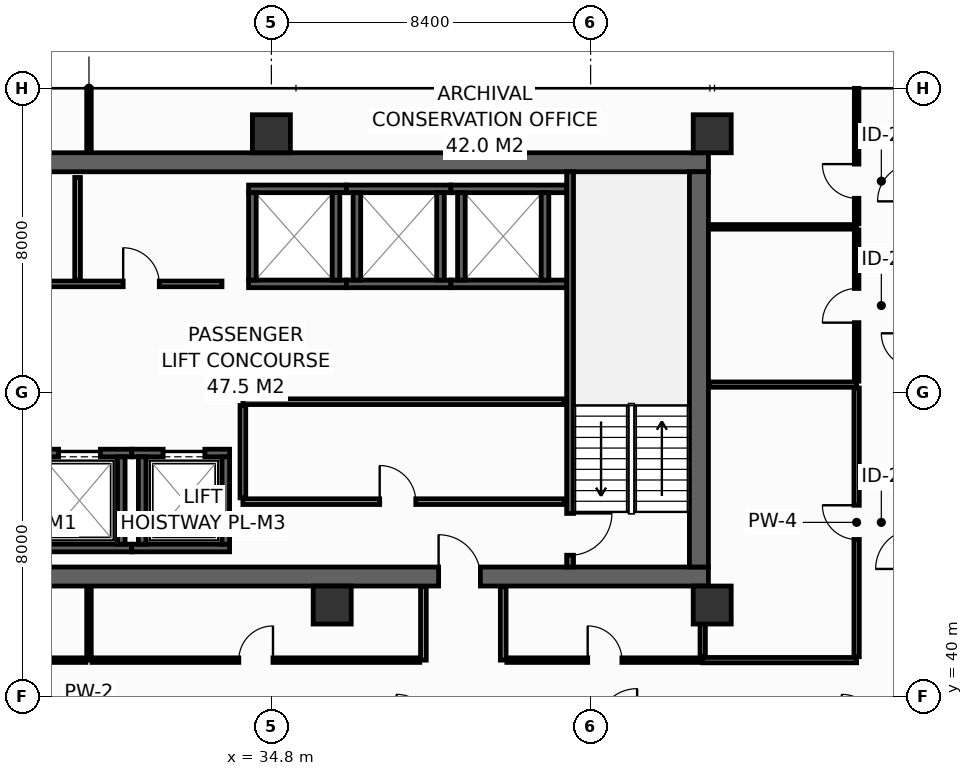
"""IFC4 building model, lengths in metres.
Left out: names, types, materials, properties, quantities, classifications, styles, units other than length and angle.
Written with IfcOpenShell. Run it as: python <this file> out.ifc"""

import sys

from ifc_helpers import new_model, si_unit, direction, frame, frame_2d, origin, origin_2d, place, context, subcontext, project, spatial, rectangle, hollow_rectangle, extrude, element, fill, save


model = new_model("IFC4")
c1 = context("Model", 3, precision=1e-05, world=origin(), true_north=direction((0.0, 1.0)))
c2 = subcontext(c1, "Body", "Model", "MODEL_VIEW")
j1 = project(units=[si_unit("LENGTHUNIT", "METRE"), si_unit("PLANEANGLEUNIT", "RADIAN")], contexts=[c1])
p1 = place(None, origin())
s1 = spatial("IfcSite", under=j1, at=p1, CompositionType="ELEMENT")
p2 = place(p1, origin())
s2 = spatial("IfcBuilding", under=s1, at=p2, CompositionType="ELEMENT")
p3 = place(p2, frame((0.0, 0.0, 179.0)))
s3 = spatial("IfcBuildingStorey", under=s2, at=p3, CompositionType="ELEMENT", Elevation=179.0)
p4 = place(p3, frame((13.6, 43.15, 0.0), z_axis=(0.0, 0.0, 1.0), x_axis=(1.0, 0.0, 0.0)))
e1 = element("IfcWall", 1, at=p4, inside=s3, PredefinedType="SHEAR", context=c2, shape_type="SweptSolid", body=[
    extrude(rectangle(XDim=32.7, YDim=0.5, at=frame_2d((16.35, 0.0))), origin(), (0.0, 0.0, 1.0), 3.55),
])
p5 = place(p4, frame((5.4, 0.0, 0.0)))
e2 = element("IfcOpeningElement", 2, at=p5, cuts=e1, PredefinedType="OPENING", context=c2, shape_type="SweptSolid", body=[
    extrude(rectangle(XDim=1.1, YDim=2.15, at=frame_2d((0.55, 1.075))), frame((0.0, 0.26, 0.0), z_axis=(0.0, -1.0, 0.0), x_axis=(1.0, 0.0, 0.0)), (0.0, 0.0, 1.0), 0.52),
])
p6 = place(p4, frame((25.6, 0.0, 0.0)))
e3 = element("IfcOpeningElement", 3, at=p6, cuts=e1, PredefinedType="OPENING", context=c2, shape_type="SweptSolid", body=[
    extrude(rectangle(XDim=1.1, YDim=2.15, at=frame_2d((0.55, 1.075))), frame((0.0, 0.26, 0.0), z_axis=(0.0, -1.0, 0.0), x_axis=(1.0, 0.0, 0.0)), (0.0, 0.0, 1.0), 0.52),
])
p7 = place(p3, frame((13.6, 54.05, 0.0), z_axis=(0.0, 0.0, 1.0), x_axis=(1.0, 0.0, 0.0)))
e4 = element("IfcWall", 4, at=p7, inside=s3, PredefinedType="SHEAR", context=c2, shape_type="SweptSolid", body=[
    extrude(rectangle(XDim=32.7, YDim=0.5, at=frame_2d((16.35, 0.0))), origin(), (0.0, 0.0, 1.0), 3.55),
])
p8 = place(p3, frame((46.05, 43.4, 0.0), z_axis=(0.0, 0.0, 1.0), x_axis=(0.0, 1.0, 0.0)))
e5 = element("IfcWall", 5, at=p8, inside=s3, PredefinedType="SHEAR", context=c2, shape_type="SweptSolid", body=[
    extrude(rectangle(XDim=10.4, YDim=0.5, at=frame_2d((5.2, 0.0))), origin(), (0.0, 0.0, 1.0), 3.55),
])
for number, where, z_axis, x_axis in (
    (6, (34.8, 54.8, 0.0), (0.0, 0.0, 1.0), (1.0, 0.0, 0.0)),
    (7, (46.4, 54.8, 0.0), (0.0, 0.0, 1.0), (1.0, 0.0, 0.0)),
    (8, (36.4, 42.4, 0.0), (0.0, 0.0, 1.0), (1.0, 0.0, 0.0)),
    (9, (46.4, 42.4, 0.0), (0.0, 0.0, 1.0), (1.0, 0.0, 0.0)),
):
    element("IfcColumn", number, at=place(p3, frame(where, z_axis=z_axis, x_axis=x_axis)), inside=s3, PredefinedType="COLUMN", context=c2, shape_type="SweptSolid", body=[
        extrude(hollow_rectangle(XDim=1.0, YDim=1.0, WallThickness=0.045, at=origin_2d()), origin(), (0.0, 0.0, 1.0), 3.8),
    ])
p9 = place(p3, frame((28.375, 43.9, 0.0), z_axis=(0.0, 0.0, 1.0), x_axis=(1.0, 0.0, 0.0)))
e10 = element("IfcWall", 10, at=p9, inside=s3, PredefinedType="SHEAR", context=c2, shape_type="SweptSolid", body=[
    extrude(rectangle(XDim=2.75, YDim=0.2, at=frame_2d((1.375, 0.0))), origin(), (0.0, 0.0, 1.0), 3.55),
])
p10 = place(p3, frame((28.375, 46.4, 0.0), z_axis=(0.0, 0.0, 1.0), x_axis=(1.0, 0.0, 0.0)))
e11 = element("IfcWall", 11, at=p10, inside=s3, PredefinedType="SHEAR", context=c2, shape_type="SweptSolid", body=[
    extrude(rectangle(XDim=2.75, YDim=0.2, at=frame_2d((1.375, 0.0))), origin(), (0.0, 0.0, 1.0), 3.55),
])
p11 = place(p10, frame((0.825, 0.0, 0.0)))
e12 = element("IfcOpeningElement", 12, at=p11, cuts=e11, PredefinedType="OPENING", context=c2, shape_type="SweptSolid", body=[
    extrude(rectangle(XDim=1.1, YDim=2.2, at=frame_2d((0.55, 1.1))), frame((0.0, 0.11, 0.0), z_axis=(0.0, -1.0, 0.0), x_axis=(1.0, 0.0, 0.0)), (0.0, 0.0, 1.0), 0.22),
])
p12 = place(p3, frame((30.85, 44.0, 0.0), z_axis=(0.0, 0.0, 1.0), x_axis=(0.0, 1.0, 0.0)))
e13 = element("IfcWall", 13, at=p12, inside=s3, PredefinedType="SHEAR", context=c2, shape_type="SweptSolid", body=[
    extrude(rectangle(XDim=2.3, YDim=0.2, at=frame_2d((1.15, 0.0))), origin(), (0.0, 0.0, 1.0), 3.55),
])
p13 = place(p3, frame((31.125, 43.9, 0.0), z_axis=(0.0, 0.0, 1.0), x_axis=(1.0, 0.0, 0.0)))
e14 = element("IfcWall", 14, at=p13, inside=s3, PredefinedType="SHEAR", context=c2, shape_type="SweptSolid", body=[
    extrude(rectangle(XDim=2.575, YDim=0.2, at=frame_2d((1.288, 0.0))), origin(), (0.0, 0.0, 1.0), 3.55),
])
p14 = place(p3, frame((31.125, 46.4, 0.0), z_axis=(0.0, 0.0, 1.0), x_axis=(1.0, 0.0, 0.0)))
e15 = element("IfcWall", 15, at=p14, inside=s3, PredefinedType="SHEAR", context=c2, shape_type="SweptSolid", body=[
    extrude(rectangle(XDim=2.575, YDim=0.2, at=frame_2d((1.288, 0.0))), origin(), (0.0, 0.0, 1.0), 3.55),
])
p15 = place(p14, frame((0.825, 0.0, 0.0)))
e16 = element("IfcOpeningElement", 16, at=p15, cuts=e15, PredefinedType="OPENING", context=c2, shape_type="SweptSolid", body=[
    extrude(rectangle(XDim=1.1, YDim=2.2, at=frame_2d((0.55, 1.1))), frame((0.0, 0.11, 0.0), z_axis=(0.0, -1.0, 0.0), x_axis=(1.0, 0.0, 0.0)), (0.0, 0.0, 1.0), 0.22),
])
for number, where, z_axis, x_axis in (
    (17, (31.4, 44.0, 0.0), (0.0, 0.0, 1.0), (0.0, 1.0, 0.0)),
    (18, (33.6, 44.0, 0.0), (0.0, 0.0, 1.0), (0.0, 1.0, 0.0)),
):
    element("IfcWall", number, at=place(p3, frame(where, z_axis=z_axis, x_axis=x_axis)), inside=s3, PredefinedType="SHEAR", context=c2, shape_type="SweptSolid", body=[
        extrude(rectangle(XDim=2.3, YDim=0.2, at=frame_2d((1.15, 0.0))), origin(), (0.0, 0.0, 1.0), 3.55),
    ])
for number, where, z_axis, x_axis in (
    (19, (34.2, 50.85, 0.0), (0.0, 0.0, 1.0), (1.0, 0.0, 0.0)),
    (20, (34.2, 53.35, 0.0), (0.0, 0.0, 1.0), (1.0, 0.0, 0.0)),
):
    element("IfcWall", number, at=place(p3, frame(where, z_axis=z_axis, x_axis=x_axis)), inside=s3, PredefinedType="SHEAR", context=c2, shape_type="SweptSolid", body=[
        extrude(rectangle(XDim=2.575, YDim=0.2, at=frame_2d((1.288, 0.0))), origin(), (0.0, 0.0, 1.0), 3.55),
    ])
for number, where, z_axis, x_axis in (
    (21, (34.3, 50.95, 0.0), (0.0, 0.0, 1.0), (0.0, 1.0, 0.0)),
    (22, (36.5, 50.95, 0.0), (0.0, 0.0, 1.0), (0.0, 1.0, 0.0)),
):
    element("IfcWall", number, at=place(p3, frame(where, z_axis=z_axis, x_axis=x_axis)), inside=s3, PredefinedType="SHEAR", context=c2, shape_type="SweptSolid", body=[
        extrude(rectangle(XDim=2.3, YDim=0.2, at=frame_2d((1.15, 0.0))), origin(), (0.0, 0.0, 1.0), 3.55),
    ])
for number, where, z_axis, x_axis in (
    (23, (36.775, 50.85, 0.0), (0.0, 0.0, 1.0), (1.0, 0.0, 0.0)),
    (24, (36.775, 53.35, 0.0), (0.0, 0.0, 1.0), (1.0, 0.0, 0.0)),
):
    element("IfcWall", number, at=place(p3, frame(where, z_axis=z_axis, x_axis=x_axis)), inside=s3, PredefinedType="SHEAR", context=c2, shape_type="SweptSolid", body=[
        extrude(rectangle(XDim=2.75, YDim=0.2, at=frame_2d((1.375, 0.0))), origin(), (0.0, 0.0, 1.0), 3.55),
    ])
for number, where, z_axis, x_axis in (
    (25, (37.05, 50.95, 0.0), (0.0, 0.0, 1.0), (0.0, 1.0, 0.0)),
    (26, (39.25, 50.95, 0.0), (0.0, 0.0, 1.0), (0.0, 1.0, 0.0)),
):
    element("IfcWall", number, at=place(p3, frame(where, z_axis=z_axis, x_axis=x_axis)), inside=s3, PredefinedType="SHEAR", context=c2, shape_type="SweptSolid", body=[
        extrude(rectangle(XDim=2.3, YDim=0.2, at=frame_2d((1.15, 0.0))), origin(), (0.0, 0.0, 1.0), 3.55),
    ])
for number, where, z_axis, x_axis in (
    (27, (39.525, 50.85, 0.0), (0.0, 0.0, 1.0), (1.0, 0.0, 0.0)),
    (28, (39.525, 53.35, 0.0), (0.0, 0.0, 1.0), (1.0, 0.0, 0.0)),
):
    element("IfcWall", number, at=place(p3, frame(where, z_axis=z_axis, x_axis=x_axis)), inside=s3, PredefinedType="SHEAR", context=c2, shape_type="SweptSolid", body=[
        extrude(rectangle(XDim=3.045, YDim=0.2, at=frame_2d((1.522, 0.0))), origin(), (0.0, 0.0, 1.0), 3.55),
    ])
for number, where, z_axis, x_axis in (
    (29, (39.8, 50.95, 0.0), (0.0, 0.0, 1.0), (0.0, 1.0, 0.0)),
    (30, (42.0, 50.95, 0.0), (0.0, 0.0, 1.0), (0.0, 1.0, 0.0)),
):
    element("IfcWall", number, at=place(p3, frame(where, z_axis=z_axis, x_axis=x_axis)), inside=s3, PredefinedType="SHEAR", context=c2, shape_type="SweptSolid", body=[
        extrude(rectangle(XDim=2.3, YDim=0.2, at=frame_2d((1.15, 0.0))), origin(), (0.0, 0.0, 1.0), 3.55),
    ])
p16 = place(p3, frame((42.66, 53.8, 0.0), z_axis=(0.0, 0.0, 1.0), x_axis=(0.0, -1.0, 0.0)))
e31 = element("IfcWall", 31, at=p16, inside=s3, PredefinedType="SHEAR", context=c2, shape_type="SweptSolid", body=[
    extrude(rectangle(XDim=10.4, YDim=0.18, at=frame_2d((5.2, 0.0))), origin(), (0.0, 0.0, 1.0), 3.55),
])
p17 = place(p16, frame((8.99, 0.0, 0.0)))
e32 = element("IfcOpeningElement", 32, at=p17, cuts=e31, PredefinedType="OPENING", context=c2, shape_type="SweptSolid", body=[
    extrude(rectangle(XDim=1.1, YDim=2.15, at=frame_2d((0.55, 1.075))), frame((0.0, 0.1, 0.0), z_axis=(0.0, -1.0, 0.0), x_axis=(1.0, 0.0, 0.0)), (0.0, 0.0, 1.0), 0.2),
])
p18 = place(p3, frame((34.05, 45.12, 0.0), z_axis=(0.0, 0.0, 1.0), x_axis=(1.0, 0.0, 0.0)))
e33 = element("IfcWall", 33, at=p18, inside=s3, PredefinedType="PARTITIONING", context=c2, shape_type="SweptSolid", body=[
    extrude(rectangle(XDim=8.45, YDim=0.15, at=frame_2d((4.225, 0.0))), origin(), (0.0, 0.0, 1.0), 3.55),
])
p19 = place(p18, frame((3.6, 0.0, 0.0)))
e34 = element("IfcOpeningElement", 34, at=p19, cuts=e33, PredefinedType="OPENING", context=c2, shape_type="SweptSolid", body=[
    extrude(rectangle(XDim=0.95, YDim=2.15, at=frame_2d((0.475, 1.075))), frame((0.0, 0.085, 0.0), z_axis=(0.0, -1.0, 0.0), x_axis=(1.0, 0.0, 0.0)), (0.0, 0.0, 1.0), 0.17),
])
p20 = place(p3, frame((34.05, 47.75, 0.0), z_axis=(0.0, 0.0, 1.0), x_axis=(1.0, 0.0, 0.0)))
e35 = element("IfcWall", 35, at=p20, inside=s3, PredefinedType="PARTITIONING", context=c2, shape_type="SweptSolid", body=[
    extrude(rectangle(XDim=8.45, YDim=0.15, at=frame_2d((4.225, 0.0))), origin(), (0.0, 0.0, 1.0), 3.55),
])
p21 = place(p3, frame((34.05, 45.22, 0.0), z_axis=(0.0, 0.0, 1.0), x_axis=(0.0, 1.0, 0.0)))
e36 = element("IfcWall", 36, at=p21, inside=s3, PredefinedType="PARTITIONING", context=c2, shape_type="SweptSolid", body=[
    extrude(rectangle(XDim=2.43, YDim=0.15, at=frame_2d((1.215, 0.0))), origin(), (0.0, 0.0, 1.0), 3.55),
])
p22 = place(p3, frame((25.85, 50.85, 0.0), z_axis=(0.0, 0.0, 1.0), x_axis=(1.0, 0.0, 0.0)))
e37 = element("IfcWall", 37, at=p22, inside=s3, PredefinedType="PARTITIONING", context=c2, shape_type="SweptSolid", body=[
    extrude(rectangle(XDim=7.65, YDim=0.15, at=frame_2d((3.825, 0.0))), origin(), (0.0, 0.0, 1.0), 3.55),
])
p23 = place(p22, frame((1.25, 0.0, 0.0)))
e38 = element("IfcOpeningElement", 38, at=p23, cuts=e37, PredefinedType="OPENING", context=c2, shape_type="SweptSolid", body=[
    extrude(rectangle(XDim=0.95, YDim=2.15, at=frame_2d((0.475, 1.075))), frame((0.0, 0.085, 0.0), z_axis=(0.0, -1.0, 0.0), x_axis=(1.0, 0.0, 0.0)), (0.0, 0.0, 1.0), 0.17),
])
p24 = place(p22, frame((5.05, 0.0, 0.0)))
e39 = element("IfcOpeningElement", 39, at=p24, cuts=e37, PredefinedType="OPENING", context=c2, shape_type="SweptSolid", body=[
    extrude(rectangle(XDim=0.95, YDim=2.15, at=frame_2d((0.475, 1.075))), frame((0.0, 0.085, 0.0), z_axis=(0.0, -1.0, 0.0), x_axis=(1.0, 0.0, 0.0)), (0.0, 0.0, 1.0), 0.17),
])
p25 = place(p3, frame((29.7, 50.95, 0.0), z_axis=(0.0, 0.0, 1.0), x_axis=(0.0, 1.0, 0.0)))
e40 = element("IfcWall", 40, at=p25, inside=s3, PredefinedType="PARTITIONING", context=c2, shape_type="SweptSolid", body=[
    extrude(rectangle(XDim=2.7, YDim=0.15, at=frame_2d((1.35, 0.0))), origin(), (0.0, 0.0, 1.0), 3.55),
])
p26 = place(p3, frame((46.15, 40.95, 0.0), z_axis=(0.0, 0.0, 1.0), x_axis=(1.0, 0.0, 0.0)))
e41 = element("IfcWall", 41, at=p26, inside=s3, PredefinedType="PARTITIONING", context=c2, shape_type="SweptSolid", body=[
    extrude(rectangle(XDim=4.05, YDim=0.14, at=frame_2d((2.025, 0.0))), origin(), (0.0, 0.0, 1.0), 3.55),
])
p27 = place(p3, frame((46.15, 41.04, 0.0), z_axis=(0.0, 0.0, 1.0), x_axis=(0.0, 1.0, 0.0)))
e42 = element("IfcWall", 42, at=p27, inside=s3, PredefinedType="PARTITIONING", context=c2, shape_type="SweptSolid", body=[
    extrude(rectangle(XDim=1.84, YDim=0.14, at=frame_2d((0.92, 0.0))), origin(), (0.0, 0.0, 1.0), 3.55),
])
p28 = place(p3, frame((46.32, 48.2, 0.0), z_axis=(0.0, 0.0, 1.0), x_axis=(1.0, 0.0, 0.0)))
e43 = element("IfcWall", 43, at=p28, inside=s3, PredefinedType="PARTITIONING", context=c2, shape_type="SweptSolid", body=[
    extrude(rectangle(XDim=3.88, YDim=0.14, at=frame_2d((1.94, 0.0))), origin(), (0.0, 0.0, 1.0), 3.55),
])
p29 = place(p3, frame((50.2, 41.04, 0.0), z_axis=(0.0, 0.0, 1.0), x_axis=(0.0, 1.0, 0.0)))
e44 = element("IfcWall", 44, at=p29, inside=s3, PredefinedType="PARTITIONING", context=c2, shape_type="SweptSolid", body=[
    extrude(rectangle(XDim=7.07, YDim=0.14, at=frame_2d((3.535, 0.0))), origin(), (0.0, 0.0, 1.0), 2.835),
])
p30 = place(p29, frame((3.085, 0.0, 0.0)))
e45 = element("IfcOpeningElement", 45, at=p30, cuts=e44, PredefinedType="OPENING", context=c2, shape_type="SweptSolid", body=[
    extrude(rectangle(XDim=0.9, YDim=2.1, at=frame_2d((0.45, 1.05))), frame((0.0, 0.08, 0.0), z_axis=(0.0, -1.0, 0.0), x_axis=(1.0, 0.0, 0.0)), (0.0, 0.0, 1.0), 0.16),
])
p31 = place(p3, frame((46.32, 52.35, 0.0), z_axis=(0.0, 0.0, 1.0), x_axis=(1.0, 0.0, 0.0)))
e46 = element("IfcWall", 46, at=p31, inside=s3, PredefinedType="PARTITIONING", context=c2, shape_type="SweptSolid", body=[
    extrude(rectangle(XDim=3.88, YDim=0.12, at=frame_2d((1.94, 0.0))), origin(), (0.0, 0.0, 1.0), 3.55),
])
p32 = place(p3, frame((30.0, 54.32, 0.0), z_axis=(0.0, 0.0, 1.0), x_axis=(0.0, 1.0, 0.0)))
e47 = element("IfcWall", 47, at=p32, inside=s3, PredefinedType="PARTITIONING", context=c2, shape_type="SweptSolid", body=[
    extrude(rectangle(XDim=1.675, YDim=0.12, at=frame_2d((0.837, 0.0))), origin(), (0.0, 0.0, 1.0), 2.935),
])
p33 = place(p3, frame((50.2, 48.29, 0.0), z_axis=(0.0, 0.0, 1.0), x_axis=(0.0, 1.0, 0.0)))
e48 = element("IfcWall", 48, at=p33, inside=s3, PredefinedType="PARTITIONING", context=c2, shape_type="SweptSolid", body=[
    extrude(rectangle(XDim=3.98, YDim=0.12, at=frame_2d((1.99, 0.0))), origin(), (0.0, 0.0, 1.0), 3.55),
])
p34 = place(p33, frame((1.54, 0.0, 0.0)))
e49 = element("IfcOpeningElement", 49, at=p34, cuts=e48, PredefinedType="OPENING", context=c2, shape_type="SweptSolid", body=[
    extrude(rectangle(XDim=0.9, YDim=2.1, at=frame_2d((0.45, 1.05))), frame((0.0, 0.07, 0.0), z_axis=(0.0, -1.0, 0.0), x_axis=(1.0, 0.0, 0.0)), (0.0, 0.0, 1.0), 0.14),
])
p35 = place(p3, frame((50.2, 52.43, 0.0), z_axis=(0.0, 0.0, 1.0), x_axis=(0.0, 1.0, 0.0)))
e50 = element("IfcWall", 50, at=p35, inside=s3, PredefinedType="PARTITIONING", context=c2, shape_type="SweptSolid", body=[
    extrude(rectangle(XDim=3.565, YDim=0.12, at=frame_2d((1.783, 0.0))), origin(), (0.0, 0.0, 1.0), 2.935),
])
p36 = place(p35, frame((0.672, 0.0, 0.0)))
e51 = element("IfcOpeningElement", 51, at=p36, cuts=e50, PredefinedType="OPENING", context=c2, shape_type="SweptSolid", body=[
    extrude(rectangle(XDim=0.9, YDim=2.1, at=frame_2d((0.45, 1.05))), frame((0.0, 0.07, 0.0), z_axis=(0.0, -1.0, 0.0), x_axis=(1.0, 0.0, 0.0)), (0.0, 0.0, 1.0), 0.14),
])
for number, where, z_axis, x_axis in (
    (52, (38.8, 40.95, 0.0), (0.0, 0.0, 1.0), (0.0, 1.0, 0.0)),
    (53, (40.9, 40.95, 0.0), (0.0, 0.0, 1.0), (0.0, 1.0, 0.0)),
):
    element("IfcWall", number, at=place(p3, frame(where, z_axis=z_axis, x_axis=x_axis)), inside=s3, PredefinedType="PARTITIONING", context=c2, shape_type="SweptSolid", body=[
        extrude(rectangle(XDim=1.93, YDim=0.15, at=frame_2d((0.965, 0.0))), origin(), (0.0, 0.0, 1.0), 3.55),
    ])
p37 = place(p3, frame((30.0, 40.95, 0.0), z_axis=(0.0, 0.0, 1.0), x_axis=(0.0, 1.0, 0.0)))
e54 = element("IfcWall", 54, at=p37, inside=s3, PredefinedType="PARTITIONING", context=c2, shape_type="SweptSolid", body=[
    extrude(rectangle(XDim=1.93, YDim=0.12, at=frame_2d((0.965, 0.0))), origin(), (0.0, 0.0, 1.0), 2.835),
])
p38 = place(p3, frame((20.795, 40.95, 0.0), z_axis=(0.0, 0.0, 1.0), x_axis=(1.0, 0.0, 0.0)))
e55 = element("IfcWall", 55, at=p38, inside=s3, PredefinedType="PARTITIONING", context=c2, shape_type="SweptSolid", body=[
    extrude(rectangle(XDim=9.125, YDim=0.12, at=frame_2d((4.562, 0.0))), origin(), (0.0, 0.0, 1.0), 2.835),
])
p39 = place(p38, frame((4.112, 0.0, 0.0)))
e56 = element("IfcOpeningElement", 56, at=p39, cuts=e55, PredefinedType="OPENING", context=c2, shape_type="SweptSolid", body=[
    extrude(rectangle(XDim=0.9, YDim=2.1, at=frame_2d((0.45, 1.05))), frame((0.0, 0.07, 0.0), z_axis=(0.0, -1.0, 0.0), x_axis=(1.0, 0.0, 0.0)), (0.0, 0.0, 1.0), 0.14),
])
p40 = place(p3, frame((30.08, 40.95, 0.0), z_axis=(0.0, 0.0, 1.0), x_axis=(1.0, 0.0, 0.0)))
e57 = element("IfcWall", 57, at=p40, inside=s3, PredefinedType="PARTITIONING", context=c2, shape_type="SweptSolid", body=[
    extrude(rectangle(XDim=8.625, YDim=0.12, at=frame_2d((4.312, 0.0))), origin(), (0.0, 0.0, 1.0), 2.835),
])
p41 = place(p40, frame((3.862, 0.0, 0.0)))
e58 = element("IfcOpeningElement", 58, at=p41, cuts=e57, PredefinedType="OPENING", context=c2, shape_type="SweptSolid", body=[
    extrude(rectangle(XDim=0.9, YDim=2.1, at=frame_2d((0.45, 1.05))), frame((0.0, 0.07, 0.0), z_axis=(0.0, -1.0, 0.0), x_axis=(1.0, 0.0, 0.0)), (0.0, 0.0, 1.0), 0.14),
])
p42 = place(p3, frame((40.995, 40.95, 0.0), z_axis=(0.0, 0.0, 1.0), x_axis=(1.0, 0.0, 0.0)))
e59 = element("IfcWall", 59, at=p42, inside=s3, PredefinedType="PARTITIONING", context=c2, shape_type="SweptSolid", body=[
    extrude(rectangle(XDim=5.155, YDim=0.12, at=frame_2d((2.577, 0.0))), origin(), (0.0, 0.0, 1.0), 3.55),
])
p43 = place(p42, frame((2.128, 0.0, 0.0)))
e60 = element("IfcOpeningElement", 60, at=p43, cuts=e59, PredefinedType="OPENING", context=c2, shape_type="SweptSolid", body=[
    extrude(rectangle(XDim=0.9, YDim=2.1, at=frame_2d((0.45, 1.05))), frame((0.0, 0.07, 0.0), z_axis=(0.0, -1.0, 0.0), x_axis=(1.0, 0.0, 0.0)), (0.0, 0.0, 1.0), 0.14),
])
p44 = place(p11, origin())
e61 = element("IfcDoor", 61, at=p44, inside=s3, OperationType="SLIDING_TO_LEFT", PredefinedType="DOOR", context=c2, shape_type="SweptSolid", body=[
    extrude(rectangle(XDim=1.1, YDim=2.2, at=frame_2d((0.55, 1.1))), frame((0.0, 0.025, 0.0), z_axis=(0.0, -1.0, 0.0), x_axis=(1.0, 0.0, 0.0)), (0.0, 0.0, 1.0), 0.05),
])
fill(e12, e61)
p45 = place(p15, origin())
e62 = element("IfcDoor", 62, at=p45, inside=s3, OperationType="SLIDING_TO_LEFT", PredefinedType="DOOR", context=c2, shape_type="SweptSolid", body=[
    extrude(rectangle(XDim=1.1, YDim=2.2, at=frame_2d((0.55, 1.1))), frame((0.0, 0.025, 0.0), z_axis=(0.0, -1.0, 0.0), x_axis=(1.0, 0.0, 0.0)), (0.0, 0.0, 1.0), 0.05),
])
fill(e16, e62)
p46 = place(p17, origin())
e63 = element("IfcDoor", 63, at=p46, inside=s3, OperationType="SINGLE_SWING_LEFT", PredefinedType="DOOR", context=c2, shape_type="SweptSolid", body=[
    extrude(rectangle(XDim=1.1, YDim=2.15, at=frame_2d((0.55, 1.075))), frame((0.0, 0.025, 0.0), z_axis=(0.0, -1.0, 0.0), x_axis=(1.0, 0.0, 0.0)), (0.0, 0.0, 1.0), 0.05),
])
fill(e32, e63)
p47 = place(p6, origin())
e64 = element("IfcDoor", 64, at=p47, inside=s3, OperationType="SINGLE_SWING_LEFT", PredefinedType="DOOR", context=c2, shape_type="SweptSolid", body=[
    extrude(rectangle(XDim=1.1, YDim=2.15, at=frame_2d((0.55, 1.075))), frame((0.0, 0.025, 0.0), z_axis=(0.0, -1.0, 0.0), x_axis=(1.0, 0.0, 0.0)), (0.0, 0.0, 1.0), 0.05),
])
fill(e3, e64)
p48 = place(p19, origin())
e65 = element("IfcDoor", 65, at=p48, inside=s3, OperationType="SINGLE_SWING_LEFT", PredefinedType="DOOR", context=c2, shape_type="SweptSolid", body=[
    extrude(rectangle(XDim=0.95, YDim=2.15, at=frame_2d((0.475, 1.075))), frame((0.0, 0.025, 0.0), z_axis=(0.0, -1.0, 0.0), x_axis=(1.0, 0.0, 0.0)), (0.0, 0.0, 1.0), 0.05),
])
fill(e34, e65)
p49 = place(p24, origin())
e66 = element("IfcDoor", 66, at=p49, inside=s3, OperationType="SINGLE_SWING_LEFT", PredefinedType="DOOR", context=c2, shape_type="SweptSolid", body=[
    extrude(rectangle(XDim=0.95, YDim=2.15, at=frame_2d((0.475, 1.075))), frame((0.0, 0.025, 0.0), z_axis=(0.0, -1.0, 0.0), x_axis=(1.0, 0.0, 0.0)), (0.0, 0.0, 1.0), 0.05),
])
fill(e39, e66)
p50 = place(p30, origin())
e67 = element("IfcDoor", 67, at=p50, inside=s3, OperationType="SINGLE_SWING_RIGHT", PredefinedType="DOOR", context=c2, shape_type="SweptSolid", body=[
    extrude(rectangle(XDim=0.9, YDim=2.1, at=frame_2d((0.45, 1.05))), frame((0.0, 0.025, 0.0), z_axis=(0.0, -1.0, 0.0), x_axis=(1.0, 0.0, 0.0)), (0.0, 0.0, 1.0), 0.05),
])
fill(e45, e67)
p51 = place(p34, origin())
e68 = element("IfcDoor", 68, at=p51, inside=s3, OperationType="SINGLE_SWING_LEFT", PredefinedType="DOOR", context=c2, shape_type="SweptSolid", body=[
    extrude(rectangle(XDim=0.9, YDim=2.1, at=frame_2d((0.45, 1.05))), frame((0.0, 0.025, 0.0), z_axis=(0.0, -1.0, 0.0), x_axis=(1.0, 0.0, 0.0)), (0.0, 0.0, 1.0), 0.05),
])
fill(e49, e68)
p52 = place(p36, origin())
e69 = element("IfcDoor", 69, at=p52, inside=s3, OperationType="SINGLE_SWING_RIGHT", PredefinedType="DOOR", context=c2, shape_type="SweptSolid", body=[
    extrude(rectangle(XDim=0.9, YDim=2.1, at=frame_2d((0.45, 1.05))), frame((0.0, 0.025, 0.0), z_axis=(0.0, -1.0, 0.0), x_axis=(1.0, 0.0, 0.0)), (0.0, 0.0, 1.0), 0.05),
])
fill(e51, e69)
p53 = place(p41, origin())
e70 = element("IfcDoor", 70, at=p53, inside=s3, OperationType="SINGLE_SWING_RIGHT", PredefinedType="DOOR", context=c2, shape_type="SweptSolid", body=[
    extrude(rectangle(XDim=0.9, YDim=2.1, at=frame_2d((0.45, 1.05))), frame((0.0, 0.025, 0.0), z_axis=(0.0, -1.0, 0.0), x_axis=(1.0, 0.0, 0.0)), (0.0, 0.0, 1.0), 0.05),
])
fill(e58, e70)
p54 = place(p43, origin())
e71 = element("IfcDoor", 71, at=p54, inside=s3, OperationType="SINGLE_SWING_LEFT", PredefinedType="DOOR", context=c2, shape_type="SweptSolid", body=[
    extrude(rectangle(XDim=0.9, YDim=2.1, at=frame_2d((0.45, 1.05))), frame((0.0, 0.025, 0.0), z_axis=(0.0, -1.0, 0.0), x_axis=(1.0, 0.0, 0.0)), (0.0, 0.0, 1.0), 0.05),
])
fill(e60, e71)
save(model, sys.argv[1])
